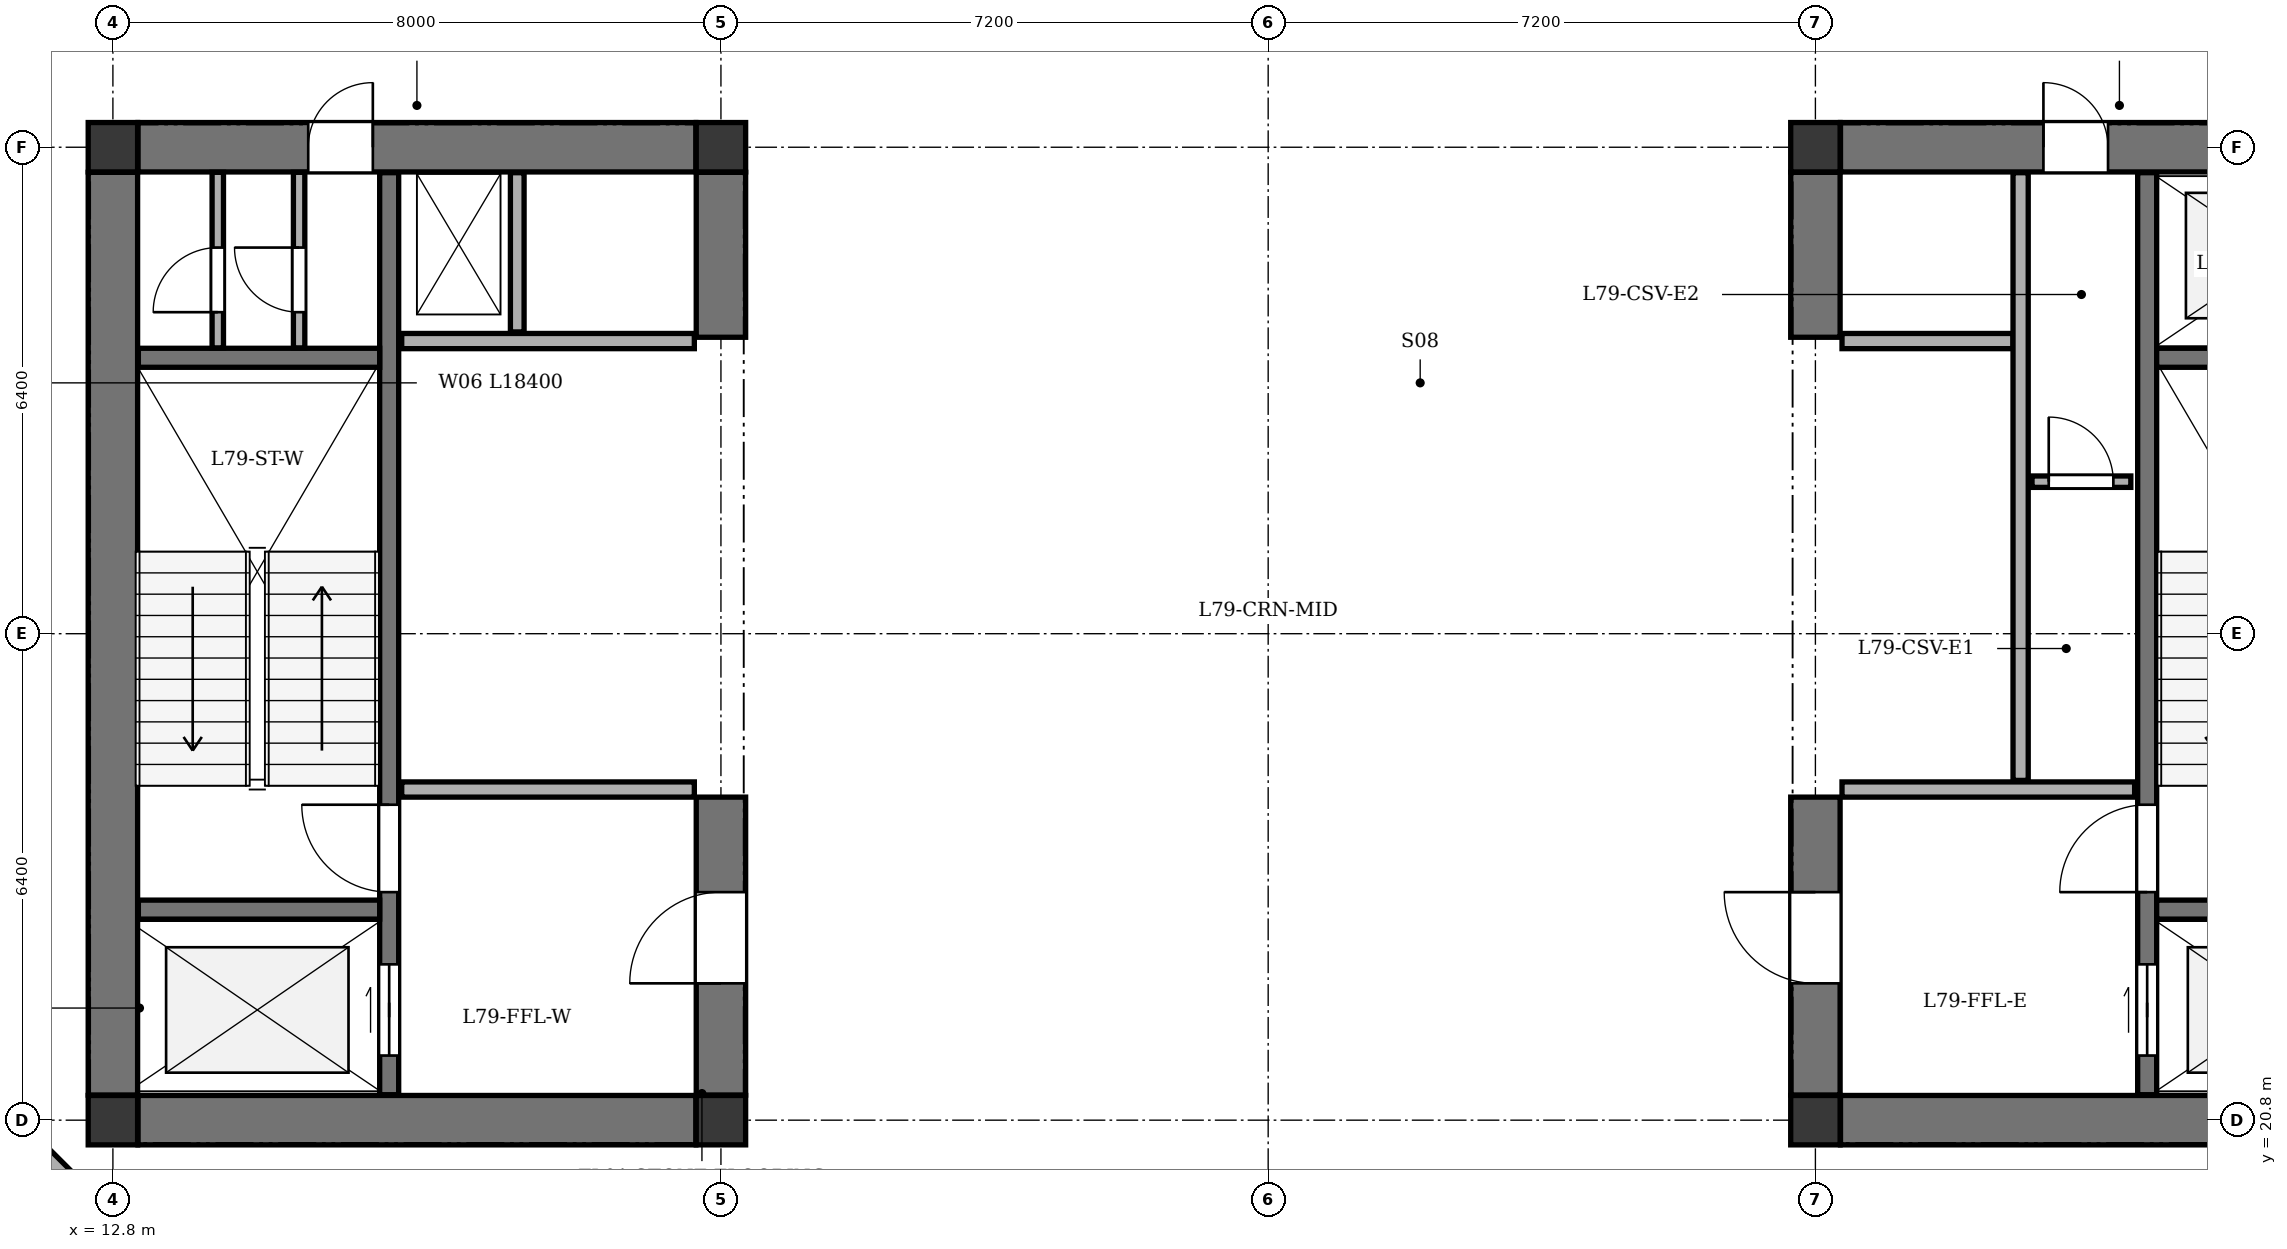
"""IFC4 building model, lengths in metres.
Left out: names, types, materials, properties, quantities, classifications, styles, units other than length and angle.
Written with IfcOpenShell. Run it as: python <this file> out.ifc"""

import sys

from ifc_helpers import new_model, si_unit, direction, frame, frame_2d, origin, origin_2d, place, context, subcontext, project, spatial, rectangle, extrude, element, fill, save


model = new_model("IFC4")
c1 = context("Model", 3, precision=1e-05, world=origin(), true_north=direction((0.0, 1.0)))
c2 = subcontext(c1, "Body", "Model", "MODEL_VIEW")
j1 = project(units=[si_unit("LENGTHUNIT", "METRE"), si_unit("PLANEANGLEUNIT", "RADIAN")], contexts=[c1])
p1 = place(None, origin())
s1 = spatial("IfcSite", under=j1, at=p1, CompositionType="ELEMENT")
p2 = place(p1, origin())
s2 = spatial("IfcBuilding", under=s1, at=p2, CompositionType="ELEMENT")
p3 = place(p2, frame((0.0, 0.0, 300.6)))
s3 = spatial("IfcBuildingStorey", under=s2, at=p3, CompositionType="ELEMENT", Elevation=300.6)
for number, where, z_axis, x_axis in (
    (1, (12.8, 20.8, 0.0), (0.0, 0.0, 1.0), (1.0, 0.0, 0.0)),
    (2, (20.8, 20.8, 0.0), (0.0, 0.0, 1.0), (1.0, 0.0, 0.0)),
    (3, (12.8, 33.6, 0.0), (0.0, 0.0, 1.0), (1.0, 0.0, 0.0)),
    (4, (20.8, 33.6, 0.0), (0.0, 0.0, 1.0), (1.0, 0.0, 0.0)),
    (5, (35.2, 20.8, 0.0), (0.0, 0.0, 1.0), (1.0, 0.0, 0.0)),
    (6, (35.2, 33.6, 0.0), (0.0, 0.0, 1.0), (1.0, 0.0, 0.0)),
):
    element("IfcColumn", number, at=place(p3, frame(where, z_axis=z_axis, x_axis=x_axis)), inside=s3, PredefinedType="COLUMN", context=c2, shape_type="SweptSolid", body=[
        extrude(rectangle(XDim=0.65, YDim=0.65, at=origin_2d()), origin(), (0.0, 0.0, 1.0), 4.2),
    ])
p4 = place(p3, frame((14.2, 17.97, 0.0), z_axis=(0.0, 0.0, 1.0), x_axis=(-0.707080859425, 0.707132701998, 0.0)))
e7 = element("IfcWall", 7, at=p4, inside=s3, PredefinedType="STANDARD", context=c2, shape_type="SweptSolid", body=[
    extrude(rectangle(XDim=4.709, YDim=0.3, at=frame_2d((2.354, 0.0))), origin(), (0.0, 0.0, 1.0), 3.545),
])
p5 = place(p3, frame((12.8, 21.13, 0.0), z_axis=(0.0, 0.0, 1.0), x_axis=(0.0, 1.0, 0.0)))
e8 = element("IfcWall", 8, at=p5, inside=s3, PredefinedType="SHEAR", context=c2, shape_type="SweptSolid", body=[
    extrude(rectangle(XDim=12.14, YDim=0.65, at=frame_2d((6.07, 0.0))), origin(), (0.0, 0.0, 1.0), 3.92),
])
p6 = place(p3, frame((13.13, 20.8, 0.0), z_axis=(0.0, 0.0, 1.0), x_axis=(1.0, 0.0, 0.0)))
e9 = element("IfcWall", 9, at=p6, inside=s3, PredefinedType="SHEAR", context=c2, shape_type="SweptSolid", body=[
    extrude(rectangle(XDim=7.34, YDim=0.65, at=frame_2d((3.67, 0.0))), origin(), (0.0, 0.0, 1.0), 3.92),
])
p7 = place(p3, frame((13.13, 33.6, 0.0), z_axis=(0.0, 0.0, 1.0), x_axis=(1.0, 0.0, 0.0)))
e10 = element("IfcWall", 10, at=p7, inside=s3, PredefinedType="SHEAR", context=c2, shape_type="SweptSolid", body=[
    extrude(rectangle(XDim=7.34, YDim=0.65, at=frame_2d((3.67, 0.0))), origin(), (0.0, 0.0, 1.0), 3.92),
])
p8 = place(p7, frame((2.24, 0.0, 0.0)))
e11 = element("IfcOpeningElement", 11, at=p8, cuts=e10, PredefinedType="OPENING", context=c2, shape_type="SweptSolid", body=[
    extrude(rectangle(XDim=0.85, YDim=2.02, at=frame_2d((0.425, 1.01))), frame((0.0, 0.335, 0.0), z_axis=(0.0, -1.0, 0.0), x_axis=(1.0, 0.0, 0.0)), (0.0, 0.0, 1.0), 0.67),
])
p9 = place(p3, frame((20.8, 21.13, 0.0), z_axis=(0.0, 0.0, 1.0), x_axis=(0.0, 1.0, 0.0)))
e12 = element("IfcWall", 12, at=p9, inside=s3, PredefinedType="SHEAR", context=c2, shape_type="SweptSolid", body=[
    extrude(rectangle(XDim=3.92, YDim=0.65, at=frame_2d((1.96, 0.0))), origin(), (0.0, 0.0, 1.0), 3.92),
])
p10 = place(p9, frame((1.47, 0.0, 0.0)))
e13 = element("IfcOpeningElement", 13, at=p10, cuts=e12, PredefinedType="OPENING", context=c2, shape_type="SweptSolid", body=[
    extrude(rectangle(XDim=1.2, YDim=2.15, at=frame_2d((0.6, 1.075))), frame((0.0, 0.335, 0.0), z_axis=(0.0, -1.0, 0.0), x_axis=(1.0, 0.0, 0.0)), (0.0, 0.0, 1.0), 0.67),
])
p11 = place(p3, frame((20.8, 31.1, 0.0), z_axis=(0.0, 0.0, 1.0), x_axis=(0.0, 1.0, 0.0)))
e14 = element("IfcWall", 14, at=p11, inside=s3, PredefinedType="SHEAR", context=c2, shape_type="SweptSolid", body=[
    extrude(rectangle(XDim=2.17, YDim=0.65, at=frame_2d((1.085, 0.0))), origin(), (0.0, 0.0, 1.0), 3.92),
])
p12 = place(p3, frame((16.435, 21.135, 0.0), z_axis=(0.0, 0.0, 1.0), x_axis=(0.0, 1.0, 0.0)))
e15 = element("IfcWall", 15, at=p12, inside=s3, PredefinedType="SHEAR", context=c2, shape_type="SweptSolid", body=[
    extrude(rectangle(XDim=12.13, YDim=0.25, at=frame_2d((6.065, 0.0))), origin(), (0.0, 0.0, 1.0), 3.92),
])
p13 = place(p12, frame((0.515, 0.0, 0.0)))
e16 = element("IfcOpeningElement", 16, at=p13, cuts=e15, PredefinedType="OPENING", context=c2, shape_type="SweptSolid", body=[
    extrude(rectangle(XDim=1.2, YDim=2.15, at=frame_2d((0.6, 1.075))), frame((0.0, 0.135, 0.0), z_axis=(0.0, -1.0, 0.0), x_axis=(1.0, 0.0, 0.0)), (0.0, 0.0, 1.0), 0.27),
])
p14 = place(p12, frame((2.665, 0.0, 0.0)))
e17 = element("IfcOpeningElement", 17, at=p14, cuts=e15, PredefinedType="OPENING", context=c2, shape_type="SweptSolid", body=[
    extrude(rectangle(XDim=1.15, YDim=2.15, at=frame_2d((0.575, 1.075))), frame((0.0, 0.135, 0.0), z_axis=(0.0, -1.0, 0.0), x_axis=(1.0, 0.0, 0.0)), (0.0, 0.0, 1.0), 0.27),
])
for number, where, z_axis, x_axis in (
    (18, (13.135, 23.57, 0.0), (0.0, 0.0, 1.0), (1.0, 0.0, 0.0)),
    (19, (13.135, 30.83, 0.0), (0.0, 0.0, 1.0), (1.0, 0.0, 0.0)),
):
    element("IfcWall", number, at=place(p3, frame(where, z_axis=z_axis, x_axis=x_axis)), inside=s3, PredefinedType="SHEAR", context=c2, shape_type="SweptSolid", body=[
        extrude(rectangle(XDim=3.175, YDim=0.25, at=frame_2d((1.587, 0.0))), origin(), (0.0, 0.0, 1.0), 3.92),
    ])
for number, where, z_axis, x_axis in (
    (20, (16.6, 25.15, 0.0), (0.0, 0.0, 1.0), (1.0, 0.0, 0.0)),
    (21, (16.6, 31.05, 0.0), (0.0, 0.0, 1.0), (1.0, 0.0, 0.0)),
):
    element("IfcWall", number, at=place(p3, frame(where, z_axis=z_axis, x_axis=x_axis)), inside=s3, PredefinedType="SOLIDWALL", context=c2, shape_type="SweptSolid", body=[
        extrude(rectangle(XDim=3.85, YDim=0.2, at=frame_2d((1.925, 0.0))), origin(), (0.0, 0.0, 1.0), 3.92),
    ])
p15 = place(p3, frame((18.12, 31.17, 0.0), z_axis=(0.0, 0.0, 1.0), x_axis=(0.0, 1.0, 0.0)))
e22 = element("IfcWall", 22, at=p15, inside=s3, PredefinedType="PARTITIONING", context=c2, shape_type="SweptSolid", body=[
    extrude(rectangle(XDim=2.095, YDim=0.18, at=frame_2d((1.047, 0.0))), origin(), (0.0, 0.0, 1.0), 3.92),
])
p16 = place(p3, frame((35.53, 20.8, 0.0), z_axis=(0.0, 0.0, 1.0), x_axis=(1.0, 0.0, 0.0)))
e23 = element("IfcWall", 23, at=p16, inside=s3, PredefinedType="SHEAR", context=c2, shape_type="SweptSolid", body=[
    extrude(rectangle(XDim=7.34, YDim=0.65, at=frame_2d((3.67, 0.0))), origin(), (0.0, 0.0, 1.0), 3.92),
])
p17 = place(p3, frame((35.53, 33.6, 0.0), z_axis=(0.0, 0.0, 1.0), x_axis=(1.0, 0.0, 0.0)))
e24 = element("IfcWall", 24, at=p17, inside=s3, PredefinedType="SHEAR", context=c2, shape_type="SweptSolid", body=[
    extrude(rectangle(XDim=7.34, YDim=0.65, at=frame_2d((3.67, 0.0))), origin(), (0.0, 0.0, 1.0), 3.92),
])
p18 = place(p17, frame((4.87, 0.0, 0.0)))
e25 = element("IfcOpeningElement", 25, at=p18, cuts=e24, PredefinedType="OPENING", context=c2, shape_type="SweptSolid", body=[
    extrude(rectangle(XDim=1.3, YDim=2.15, at=frame_2d((0.65, 1.075))), frame((0.0, 0.335, 0.0), z_axis=(0.0, -1.0, 0.0), x_axis=(1.0, 0.0, 0.0)), (0.0, 0.0, 1.0), 0.67),
])
p19 = place(p17, frame((2.67, 0.0, 0.0)))
e26 = element("IfcOpeningElement", 26, at=p19, cuts=e24, PredefinedType="OPENING", context=c2, shape_type="SweptSolid", body=[
    extrude(rectangle(XDim=0.85, YDim=2.02, at=frame_2d((0.425, 1.01))), frame((0.0, 0.335, 0.0), z_axis=(0.0, -1.0, 0.0), x_axis=(1.0, 0.0, 0.0)), (0.0, 0.0, 1.0), 0.67),
])
p20 = place(p3, frame((35.2, 21.13, 0.0), z_axis=(0.0, 0.0, 1.0), x_axis=(0.0, 1.0, 0.0)))
e27 = element("IfcWall", 27, at=p20, inside=s3, PredefinedType="SHEAR", context=c2, shape_type="SweptSolid", body=[
    extrude(rectangle(XDim=3.92, YDim=0.65, at=frame_2d((1.96, 0.0))), origin(), (0.0, 0.0, 1.0), 3.92),
])
p21 = place(p20, frame((1.47, 0.0, 0.0)))
e28 = element("IfcOpeningElement", 28, at=p21, cuts=e27, PredefinedType="OPENING", context=c2, shape_type="SweptSolid", body=[
    extrude(rectangle(XDim=1.2, YDim=2.15, at=frame_2d((0.6, 1.075))), frame((0.0, 0.335, 0.0), z_axis=(0.0, -1.0, 0.0), x_axis=(1.0, 0.0, 0.0)), (0.0, 0.0, 1.0), 0.67),
])
p22 = place(p3, frame((35.2, 31.1, 0.0), z_axis=(0.0, 0.0, 1.0), x_axis=(0.0, 1.0, 0.0)))
e29 = element("IfcWall", 29, at=p22, inside=s3, PredefinedType="SHEAR", context=c2, shape_type="SweptSolid", body=[
    extrude(rectangle(XDim=2.17, YDim=0.65, at=frame_2d((1.085, 0.0))), origin(), (0.0, 0.0, 1.0), 3.92),
])
p23 = place(p3, frame((39.565, 21.135, 0.0), z_axis=(0.0, 0.0, 1.0), x_axis=(0.0, 1.0, 0.0)))
e30 = element("IfcWall", 30, at=p23, inside=s3, PredefinedType="SHEAR", context=c2, shape_type="SweptSolid", body=[
    extrude(rectangle(XDim=12.13, YDim=0.25, at=frame_2d((6.065, 0.0))), origin(), (0.0, 0.0, 1.0), 3.92),
])
p24 = place(p23, frame((0.515, 0.0, 0.0)))
e31 = element("IfcOpeningElement", 31, at=p24, cuts=e30, PredefinedType="OPENING", context=c2, shape_type="SweptSolid", body=[
    extrude(rectangle(XDim=1.2, YDim=2.15, at=frame_2d((0.6, 1.075))), frame((0.0, 0.135, 0.0), z_axis=(0.0, -1.0, 0.0), x_axis=(1.0, 0.0, 0.0)), (0.0, 0.0, 1.0), 0.27),
])
p25 = place(p23, frame((2.665, 0.0, 0.0)))
e32 = element("IfcOpeningElement", 32, at=p25, cuts=e30, PredefinedType="OPENING", context=c2, shape_type="SweptSolid", body=[
    extrude(rectangle(XDim=1.15, YDim=2.15, at=frame_2d((0.575, 1.075))), frame((0.0, 0.135, 0.0), z_axis=(0.0, -1.0, 0.0), x_axis=(1.0, 0.0, 0.0)), (0.0, 0.0, 1.0), 0.27),
])
for number, where, z_axis, x_axis in (
    (33, (39.69, 23.57, 0.0), (0.0, 0.0, 1.0), (1.0, 0.0, 0.0)),
    (34, (39.69, 30.83, 0.0), (0.0, 0.0, 1.0), (1.0, 0.0, 0.0)),
):
    element("IfcWall", number, at=place(p3, frame(where, z_axis=z_axis, x_axis=x_axis)), inside=s3, PredefinedType="SHEAR", context=c2, shape_type="SweptSolid", body=[
        extrude(rectangle(XDim=3.175, YDim=0.25, at=frame_2d((1.587, 0.0))), origin(), (0.0, 0.0, 1.0), 3.92),
    ])
p26 = place(p3, frame((35.55, 25.15, 0.0), z_axis=(0.0, 0.0, 1.0), x_axis=(1.0, 0.0, 0.0)))
e35 = element("IfcWall", 35, at=p26, inside=s3, PredefinedType="SOLIDWALL", context=c2, shape_type="SweptSolid", body=[
    extrude(rectangle(XDim=3.85, YDim=0.2, at=frame_2d((1.925, 0.0))), origin(), (0.0, 0.0, 1.0), 3.92),
])
p27 = place(p3, frame((35.55, 31.05, 0.0), z_axis=(0.0, 0.0, 1.0), x_axis=(1.0, 0.0, 0.0)))
e36 = element("IfcWall", 36, at=p27, inside=s3, PredefinedType="SOLIDWALL", context=c2, shape_type="SweptSolid", body=[
    extrude(rectangle(XDim=2.25, YDim=0.2, at=frame_2d((1.125, 0.0))), origin(), (0.0, 0.0, 1.0), 3.92),
])
p28 = place(p3, frame((37.9, 25.27, 0.0), z_axis=(0.0, 0.0, 1.0), x_axis=(0.0, 1.0, 0.0)))
e37 = element("IfcWall", 37, at=p28, inside=s3, PredefinedType="SOLIDWALL", context=c2, shape_type="SweptSolid", body=[
    extrude(rectangle(XDim=7.995, YDim=0.2, at=frame_2d((3.998, 0.0))), origin(), (0.0, 0.0, 1.0), 3.92),
])
p29 = place(p3, frame((14.18, 30.96, 0.0), z_axis=(0.0, 0.0, 1.0), x_axis=(0.0, 1.0, 0.0)))
e38 = element("IfcWall", 38, at=p29, inside=s3, PredefinedType="PARTITIONING", context=c2, shape_type="SweptSolid", body=[
    extrude(rectangle(XDim=2.31, YDim=0.15, at=frame_2d((1.155, 0.0))), origin(), (0.0, 0.0, 1.0), 3.92),
])
p30 = place(p29, frame((0.47, 0.0, 0.0)))
e39 = element("IfcOpeningElement", 39, at=p30, cuts=e38, PredefinedType="OPENING", context=c2, shape_type="SweptSolid", body=[
    extrude(rectangle(XDim=0.85, YDim=2.02, at=frame_2d((0.425, 1.01))), frame((0.0, 0.085, 0.0), z_axis=(0.0, -1.0, 0.0), x_axis=(1.0, 0.0, 0.0)), (0.0, 0.0, 1.0), 0.17),
])
p31 = place(p3, frame((15.25, 30.96, 0.0), z_axis=(0.0, 0.0, 1.0), x_axis=(0.0, 1.0, 0.0)))
e40 = element("IfcWall", 40, at=p31, inside=s3, PredefinedType="PARTITIONING", context=c2, shape_type="SweptSolid", body=[
    extrude(rectangle(XDim=2.31, YDim=0.15, at=frame_2d((1.155, 0.0))), origin(), (0.0, 0.0, 1.0), 3.92),
])
p32 = place(p31, frame((0.47, 0.0, 0.0)))
e41 = element("IfcOpeningElement", 41, at=p32, cuts=e40, PredefinedType="OPENING", context=c2, shape_type="SweptSolid", body=[
    extrude(rectangle(XDim=0.85, YDim=2.02, at=frame_2d((0.425, 1.01))), frame((0.0, 0.085, 0.0), z_axis=(0.0, -1.0, 0.0), x_axis=(1.0, 0.0, 0.0)), (0.0, 0.0, 1.0), 0.17),
])
p33 = place(p3, frame((38.05, 29.2, 0.0), z_axis=(0.0, 0.0, 1.0), x_axis=(1.0, 0.0, 0.0)))
e42 = element("IfcWall", 42, at=p33, inside=s3, PredefinedType="PARTITIONING", context=c2, shape_type="SweptSolid", body=[
    extrude(rectangle(XDim=1.3, YDim=0.15, at=frame_2d((0.65, 0.0))), origin(), (0.0, 0.0, 1.0), 3.92),
])
p34 = place(p33, frame((0.22, 0.0, 0.0)))
e43 = element("IfcOpeningElement", 43, at=p34, cuts=e42, PredefinedType="OPENING", context=c2, shape_type="SweptSolid", body=[
    extrude(rectangle(XDim=0.85, YDim=2.02, at=frame_2d((0.425, 1.01))), frame((0.0, 0.085, 0.0), z_axis=(0.0, -1.0, 0.0), x_axis=(1.0, 0.0, 0.0)), (0.0, 0.0, 1.0), 0.17),
])
p35 = place(p8, origin())
e44 = element("IfcDoor", 44, at=p35, inside=s3, OperationType="SINGLE_SWING_RIGHT", PredefinedType="DOOR", context=c2, shape_type="SweptSolid", body=[
    extrude(rectangle(XDim=0.85, YDim=2.02, at=frame_2d((0.425, 1.01))), frame((0.0, 0.025, 0.0), z_axis=(0.0, -1.0, 0.0), x_axis=(1.0, 0.0, 0.0)), (0.0, 0.0, 1.0), 0.05),
])
fill(e11, e44)
p36 = place(p10, origin())
e45 = element("IfcDoor", 45, at=p36, inside=s3, OperationType="SINGLE_SWING_LEFT", PredefinedType="DOOR", context=c2, shape_type="SweptSolid", body=[
    extrude(rectangle(XDim=1.2, YDim=2.15, at=frame_2d((0.6, 1.075))), frame((0.0, 0.025, 0.0), z_axis=(0.0, -1.0, 0.0), x_axis=(1.0, 0.0, 0.0)), (0.0, 0.0, 1.0), 0.05),
])
fill(e13, e45)
p37 = place(p13, origin())
e46 = element("IfcDoor", 46, at=p37, inside=s3, OperationType="DOUBLE_DOOR_SLIDING", PredefinedType="DOOR", context=c2, shape_type="SweptSolid", body=[
    extrude(rectangle(XDim=1.2, YDim=2.15, at=frame_2d((0.6, 1.075))), frame((0.0, 0.025, 0.0), z_axis=(0.0, -1.0, 0.0), x_axis=(1.0, 0.0, 0.0)), (0.0, 0.0, 1.0), 0.05),
])
fill(e16, e46)
p38 = place(p14, origin())
e47 = element("IfcDoor", 47, at=p38, inside=s3, OperationType="SINGLE_SWING_RIGHT", PredefinedType="DOOR", context=c2, shape_type="SweptSolid", body=[
    extrude(rectangle(XDim=1.15, YDim=2.15, at=frame_2d((0.575, 1.075))), frame((0.0, 0.025, 0.0), z_axis=(0.0, -1.0, 0.0), x_axis=(1.0, 0.0, 0.0)), (0.0, 0.0, 1.0), 0.05),
])
fill(e17, e47)
p39 = place(p19, origin())
e48 = element("IfcDoor", 48, at=p39, inside=s3, OperationType="SINGLE_SWING_LEFT", PredefinedType="DOOR", context=c2, shape_type="SweptSolid", body=[
    extrude(rectangle(XDim=0.85, YDim=2.02, at=frame_2d((0.425, 1.01))), frame((0.0, 0.025, 0.0), z_axis=(0.0, -1.0, 0.0), x_axis=(1.0, 0.0, 0.0)), (0.0, 0.0, 1.0), 0.05),
])
fill(e26, e48)
p40 = place(p21, origin())
e49 = element("IfcDoor", 49, at=p40, inside=s3, OperationType="SINGLE_SWING_RIGHT", PredefinedType="DOOR", context=c2, shape_type="SweptSolid", body=[
    extrude(rectangle(XDim=1.2, YDim=2.15, at=frame_2d((0.6, 1.075))), frame((0.0, 0.025, 0.0), z_axis=(0.0, -1.0, 0.0), x_axis=(1.0, 0.0, 0.0)), (0.0, 0.0, 1.0), 0.05),
])
fill(e28, e49)
p41 = place(p24, origin())
e50 = element("IfcDoor", 50, at=p41, inside=s3, OperationType="DOUBLE_DOOR_SLIDING", PredefinedType="DOOR", context=c2, shape_type="SweptSolid", body=[
    extrude(rectangle(XDim=1.2, YDim=2.15, at=frame_2d((0.6, 1.075))), frame((0.0, 0.025, 0.0), z_axis=(0.0, -1.0, 0.0), x_axis=(1.0, 0.0, 0.0)), (0.0, 0.0, 1.0), 0.05),
])
fill(e31, e50)
p42 = place(p25, origin())
e51 = element("IfcDoor", 51, at=p42, inside=s3, OperationType="SINGLE_SWING_LEFT", PredefinedType="DOOR", context=c2, shape_type="SweptSolid", body=[
    extrude(rectangle(XDim=1.15, YDim=2.15, at=frame_2d((0.575, 1.075))), frame((0.0, 0.025, 0.0), z_axis=(0.0, -1.0, 0.0), x_axis=(1.0, 0.0, 0.0)), (0.0, 0.0, 1.0), 0.05),
])
fill(e32, e51)
p43 = place(p30, origin())
e52 = element("IfcDoor", 52, at=p43, inside=s3, OperationType="SINGLE_SWING_LEFT", PredefinedType="DOOR", context=c2, shape_type="SweptSolid", body=[
    extrude(rectangle(XDim=0.85, YDim=2.02, at=frame_2d((0.425, 1.01))), frame((0.0, 0.025, 0.0), z_axis=(0.0, -1.0, 0.0), x_axis=(1.0, 0.0, 0.0)), (0.0, 0.0, 1.0), 0.05),
])
fill(e39, e52)
p44 = place(p32, origin())
e53 = element("IfcDoor", 53, at=p44, inside=s3, OperationType="SINGLE_SWING_RIGHT", PredefinedType="DOOR", context=c2, shape_type="SweptSolid", body=[
    extrude(rectangle(XDim=0.85, YDim=2.02, at=frame_2d((0.425, 1.01))), frame((0.0, 0.025, 0.0), z_axis=(0.0, -1.0, 0.0), x_axis=(1.0, 0.0, 0.0)), (0.0, 0.0, 1.0), 0.05),
])
fill(e41, e53)
p45 = place(p34, origin())
e54 = element("IfcDoor", 54, at=p45, inside=s3, OperationType="SINGLE_SWING_LEFT", PredefinedType="DOOR", context=c2, shape_type="SweptSolid", body=[
    extrude(rectangle(XDim=0.85, YDim=2.02, at=frame_2d((0.425, 1.01))), frame((0.0, 0.025, 0.0), z_axis=(0.0, -1.0, 0.0), x_axis=(1.0, 0.0, 0.0)), (0.0, 0.0, 1.0), 0.05),
])
fill(e43, e54)
save(model, sys.argv[1])
